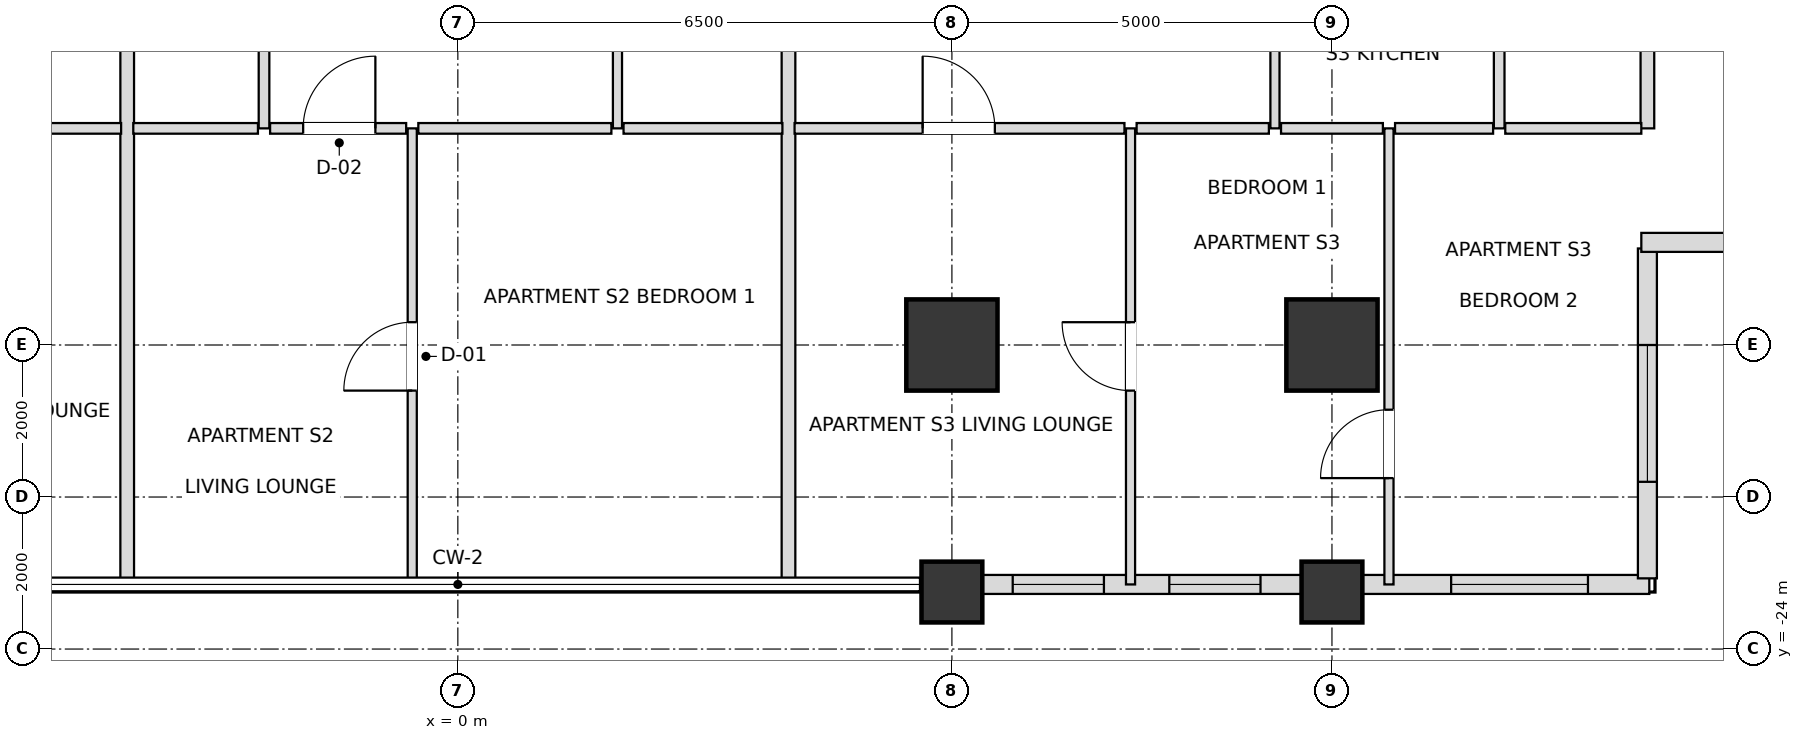
"""IFC4 building model, lengths in metres.
Left out: names, types, materials, properties, quantities, classifications, styles, units other than length and angle.
Written with IfcOpenShell. Run it as: python <this file> out.ifc"""

import sys

from ifc_helpers import new_model, si_unit, direction, frame, frame_2d, origin, origin_2d, place, context, subcontext, project, spatial, rectangle, extrude, element, fill, save


model = new_model("IFC4")
c1 = context("Model", 3, precision=1e-05, world=origin(), true_north=direction((0.0, 1.0)))
c2 = subcontext(c1, "Body", "Model", "MODEL_VIEW")
j1 = project(units=[si_unit("LENGTHUNIT", "METRE"), si_unit("PLANEANGLEUNIT", "RADIAN")], contexts=[c1])
p1 = place(None, origin())
s1 = spatial("IfcSite", under=j1, at=p1, CompositionType="ELEMENT")
p2 = place(p1, origin())
s2 = spatial("IfcBuilding", under=s1, at=p2, CompositionType="ELEMENT")
p3 = place(p2, frame((0.0, 0.0, 102.6)))
s3 = spatial("IfcBuildingStorey", under=s2, at=p3, CompositionType="ELEMENT", Elevation=102.6)
for number, where, z_axis, x_axis in (
    (1, (6.5, -20.0, 0.0), (0.0, 0.0, 1.0), (1.0, 0.0, 0.0)),
    (2, (11.5, -20.0, 0.0), (0.0, 0.0, 1.0), (1.0, 0.0, 0.0)),
):
    element("IfcColumn", number, at=place(p3, frame(where, z_axis=z_axis, x_axis=x_axis)), inside=s3, PredefinedType="USERDEFINED", context=c2, shape_type="SweptSolid", body=[
        extrude(rectangle(XDim=1.2, YDim=1.2, at=origin_2d()), origin(), (0.0, 0.0, 1.0), 3.6),
    ])
for number, where, z_axis, x_axis in (
    (3, (6.5, -23.25, 0.0), (0.0, 0.0, 1.0), (1.0, 0.0, 0.0)),
    (4, (11.5, -23.25, 0.0), (0.0, 0.0, 1.0), (1.0, 0.0, 0.0)),
):
    element("IfcColumn", number, at=place(p3, frame(where, z_axis=z_axis, x_axis=x_axis)), inside=s3, PredefinedType="COLUMN", context=c2, shape_type="SweptSolid", body=[
        extrude(rectangle(XDim=0.8, YDim=0.8, at=origin_2d()), origin(), (0.0, 0.0, 1.0), 3.6),
    ])
p4 = place(p3, frame((6.895, -23.15, 0.0), z_axis=(0.0, 0.0, 1.0), x_axis=(1.0, 0.0, 0.0)))
e5 = element("IfcWall", 5, at=p4, inside=s3, PredefinedType="SOLIDWALL", context=c2, shape_type="SweptSolid", body=[
    extrude(rectangle(XDim=4.21, YDim=0.25, at=frame_2d((2.105, 0.0))), origin(), (0.0, 0.0, 1.0), 2.736),
])
p5 = place(p4, frame((0.405, 0.0, 0.72)))
e6 = element("IfcOpeningElement", 6, at=p5, cuts=e5, PredefinedType="OPENING", context=c2, shape_type="SweptSolid", body=[
    extrude(rectangle(XDim=1.2, YDim=1.68, at=frame_2d((0.6, 0.84))), frame((0.0, 0.135, 0.0), z_axis=(0.0, -1.0, 0.0), x_axis=(1.0, 0.0, 0.0)), (0.0, 0.0, 1.0), 0.27),
])
p6 = place(p4, frame((2.465, 0.0, 0.72)))
e7 = element("IfcOpeningElement", 7, at=p6, cuts=e5, PredefinedType="OPENING", context=c2, shape_type="SweptSolid", body=[
    extrude(rectangle(XDim=1.2, YDim=1.68, at=frame_2d((0.6, 0.84))), frame((0.0, 0.135, 0.0), z_axis=(0.0, -1.0, 0.0), x_axis=(1.0, 0.0, 0.0)), (0.0, 0.0, 1.0), 0.27),
])
p7 = place(p3, frame((11.895, -23.15, 0.0), z_axis=(0.0, 0.0, 1.0), x_axis=(1.0, 0.0, 0.0)))
e8 = element("IfcWall", 8, at=p7, inside=s3, PredefinedType="SOLIDWALL", context=c2, shape_type="SweptSolid", body=[
    extrude(rectangle(XDim=3.78, YDim=0.25, at=frame_2d((1.89, 0.0))), origin(), (0.0, 0.0, 1.0), 2.736),
])
p8 = place(p7, frame((1.173, 0.0, 0.72)))
e9 = element("IfcOpeningElement", 9, at=p8, cuts=e8, PredefinedType="OPENING", context=c2, shape_type="SweptSolid", body=[
    extrude(rectangle(XDim=1.8, YDim=1.68, at=frame_2d((0.9, 0.84))), frame((0.0, 0.135, 0.0), z_axis=(0.0, -1.0, 0.0), x_axis=(1.0, 0.0, 0.0)), (0.0, 0.0, 1.0), 0.27),
])
p9 = place(p3, frame((15.65, -23.07, 0.0), z_axis=(0.0, 0.0, 1.0), x_axis=(0.0, 1.0, 0.0)))
e10 = element("IfcWall", 10, at=p9, inside=s3, PredefinedType="SOLIDWALL", context=c2, shape_type="SweptSolid", body=[
    extrude(rectangle(XDim=4.34, YDim=0.25, at=frame_2d((2.17, 0.0))), origin(), (0.0, 0.0, 1.0), 2.736),
])
p10 = place(p9, frame((1.27, 0.0, 0.72)))
e11 = element("IfcOpeningElement", 11, at=p10, cuts=e10, PredefinedType="OPENING", context=c2, shape_type="SweptSolid", body=[
    extrude(rectangle(XDim=1.8, YDim=1.68, at=frame_2d((0.9, 0.84))), frame((0.0, 0.135, 0.0), z_axis=(0.0, -1.0, 0.0), x_axis=(1.0, 0.0, 0.0)), (0.0, 0.0, 1.0), 0.27),
])
p11 = place(p3, frame((15.57, -18.65, 0.0), z_axis=(0.0, 0.0, 1.0), x_axis=(1.0, 0.0, 0.0)))
e12 = element("IfcWall", 12, at=p11, inside=s3, PredefinedType="SOLIDWALL", context=c2, shape_type="SweptSolid", body=[
    extrude(rectangle(XDim=4.66, YDim=0.25, at=frame_2d((2.33, 0.0))), origin(), (0.0, 0.0, 1.0), 2.736),
])
p12 = place(p11, frame((1.43, 0.0, 0.72)))
e13 = element("IfcOpeningElement", 13, at=p12, cuts=e12, PredefinedType="OPENING", context=c2, shape_type="SweptSolid", body=[
    extrude(rectangle(XDim=1.8, YDim=1.68, at=frame_2d((0.9, 0.84))), frame((0.0, 0.135, 0.0), z_axis=(0.0, -1.0, 0.0), x_axis=(1.0, 0.0, 0.0)), (0.0, 0.0, 1.0), 0.27),
])
p13 = place(p3, frame((-4.35, -23.15, 0.0), z_axis=(0.0, 0.0, 1.0), x_axis=(0.0, 1.0, 0.0)))
e14 = element("IfcWall", 14, at=p13, inside=s3, PredefinedType="PARTITIONING", context=c2, shape_type="SweptSolid", body=[
    extrude(rectangle(XDim=13.85, YDim=0.18, at=frame_2d((6.925, 0.0))), origin(), (0.0, 0.0, 1.0), 2.816),
])
p14 = place(p3, frame((-2.55, -17.15, 0.0), z_axis=(0.0, 0.0, 1.0), x_axis=(0.0, 1.0, 0.0)))
e15 = element("IfcWall", 15, at=p14, inside=s3, PredefinedType="PARTITIONING", context=c2, shape_type="SweptSolid", body=[
    extrude(rectangle(XDim=7.85, YDim=0.14, at=frame_2d((3.925, 0.0))), origin(), (0.0, 0.0, 1.0), 3.38),
])
p15 = place(p14, frame((3.48, 0.0, 0.0)))
e16 = element("IfcOpeningElement", 16, at=p15, cuts=e15, PredefinedType="OPENING", context=c2, shape_type="SweptSolid", body=[
    extrude(rectangle(XDim=0.9, YDim=2.1, at=frame_2d((0.45, 1.05))), frame((0.0, 0.08, 0.0), z_axis=(0.0, -1.0, 0.0), x_axis=(1.0, 0.0, 0.0)), (0.0, 0.0, 1.0), 0.16),
])
p16 = place(p3, frame((-0.6, -23.15, 0.0), z_axis=(0.0, 0.0, 1.0), x_axis=(0.0, 1.0, 0.0)))
e17 = element("IfcWall", 17, at=p16, inside=s3, PredefinedType="PARTITIONING", context=c2, shape_type="SweptSolid", body=[
    extrude(rectangle(XDim=6.0, YDim=0.12, at=frame_2d((3.0, 0.0))), origin(), (0.0, 0.0, 1.0), 2.816),
])
p17 = place(p16, frame((2.55, 0.0, 0.0)))
e18 = element("IfcOpeningElement", 18, at=p17, cuts=e17, PredefinedType="OPENING", context=c2, shape_type="SweptSolid", body=[
    extrude(rectangle(XDim=0.9, YDim=2.1, at=frame_2d((0.45, 1.05))), frame((0.0, 0.07, 0.0), z_axis=(0.0, -1.0, 0.0), x_axis=(1.0, 0.0, 0.0)), (0.0, 0.0, 1.0), 0.14),
])
p18 = place(p3, frame((2.1, -17.15, 0.0), z_axis=(0.0, 0.0, 1.0), x_axis=(0.0, 1.0, 0.0)))
e19 = element("IfcWall", 19, at=p18, inside=s3, PredefinedType="PARTITIONING", context=c2, shape_type="SweptSolid", body=[
    extrude(rectangle(XDim=7.85, YDim=0.12, at=frame_2d((3.925, 0.0))), origin(), (0.0, 0.0, 1.0), 3.38),
])
p19 = place(p18, frame((3.455, 0.0, 0.0)))
e20 = element("IfcOpeningElement", 20, at=p19, cuts=e19, PredefinedType="OPENING", context=c2, shape_type="SweptSolid", body=[
    extrude(rectangle(XDim=0.95, YDim=2.1, at=frame_2d((0.475, 1.05))), frame((0.0, 0.07, 0.0), z_axis=(0.0, -1.0, 0.0), x_axis=(1.0, 0.0, 0.0)), (0.0, 0.0, 1.0), 0.14),
])
p20 = place(p3, frame((4.35, -23.15, 0.0), z_axis=(0.0, 0.0, 1.0), x_axis=(0.0, 1.0, 0.0)))
e21 = element("IfcWall", 21, at=p20, inside=s3, PredefinedType="PARTITIONING", context=c2, shape_type="SweptSolid", body=[
    extrude(rectangle(XDim=13.85, YDim=0.18, at=frame_2d((6.925, 0.0))), origin(), (0.0, 0.0, 1.0), 2.816),
])
p21 = place(p3, frame((8.85, -23.15, 0.0), z_axis=(0.0, 0.0, 1.0), x_axis=(0.0, 1.0, 0.0)))
e22 = element("IfcWall", 22, at=p21, inside=s3, PredefinedType="PARTITIONING", context=c2, shape_type="SweptSolid", body=[
    extrude(rectangle(XDim=6.0, YDim=0.12, at=frame_2d((3.0, 0.0))), origin(), (0.0, 0.0, 1.0), 2.816),
])
p22 = place(p21, frame((2.55, 0.0, 0.0)))
e23 = element("IfcOpeningElement", 23, at=p22, cuts=e22, PredefinedType="OPENING", context=c2, shape_type="SweptSolid", body=[
    extrude(rectangle(XDim=0.9, YDim=2.1, at=frame_2d((0.45, 1.05))), frame((0.0, 0.07, 0.0), z_axis=(0.0, -1.0, 0.0), x_axis=(1.0, 0.0, 0.0)), (0.0, 0.0, 1.0), 0.14),
])
p23 = place(p3, frame((10.75, -17.15, 0.0), z_axis=(0.0, 0.0, 1.0), x_axis=(0.0, 1.0, 0.0)))
e24 = element("IfcWall", 24, at=p23, inside=s3, PredefinedType="PARTITIONING", context=c2, shape_type="SweptSolid", body=[
    extrude(rectangle(XDim=7.85, YDim=0.12, at=frame_2d((3.925, 0.0))), origin(), (0.0, 0.0, 1.0), 2.816),
])
p24 = place(p23, frame((2.681, 0.0, 0.0)))
e25 = element("IfcOpeningElement", 25, at=p24, cuts=e24, PredefinedType="OPENING", context=c2, shape_type="SweptSolid", body=[
    extrude(rectangle(XDim=0.95, YDim=2.1, at=frame_2d((0.475, 1.05))), frame((0.0, 0.07, 0.0), z_axis=(0.0, -1.0, 0.0), x_axis=(1.0, 0.0, 0.0)), (0.0, 0.0, 1.0), 0.14),
])
p25 = place(p3, frame((12.25, -23.15, 0.0), z_axis=(0.0, 0.0, 1.0), x_axis=(0.0, 1.0, 0.0)))
e26 = element("IfcWall", 26, at=p25, inside=s3, PredefinedType="PARTITIONING", context=c2, shape_type="SweptSolid", body=[
    extrude(rectangle(XDim=6.0, YDim=0.12, at=frame_2d((3.0, 0.0))), origin(), (0.0, 0.0, 1.0), 2.736),
])
p26 = place(p25, frame((1.399, 0.0, 0.0)))
e27 = element("IfcOpeningElement", 27, at=p26, cuts=e26, PredefinedType="OPENING", context=c2, shape_type="SweptSolid", body=[
    extrude(rectangle(XDim=0.9, YDim=2.1, at=frame_2d((0.45, 1.05))), frame((0.0, 0.07, 0.0), z_axis=(0.0, -1.0, 0.0), x_axis=(1.0, 0.0, 0.0)), (0.0, 0.0, 1.0), 0.14),
])
p27 = place(p3, frame((13.7, -17.15, 0.0), z_axis=(0.0, 0.0, 1.0), x_axis=(0.0, 1.0, 0.0)))
e28 = element("IfcWall", 28, at=p27, inside=s3, PredefinedType="PARTITIONING", context=c2, shape_type="SweptSolid", body=[
    extrude(rectangle(XDim=7.85, YDim=0.14, at=frame_2d((3.925, 0.0))), origin(), (0.0, 0.0, 1.0), 2.736),
])
p28 = place(p27, frame((3.48, 0.0, 0.0)))
e29 = element("IfcOpeningElement", 29, at=p28, cuts=e28, PredefinedType="OPENING", context=c2, shape_type="SweptSolid", body=[
    extrude(rectangle(XDim=0.9, YDim=2.1, at=frame_2d((0.45, 1.05))), frame((0.0, 0.08, 0.0), z_axis=(0.0, -1.0, 0.0), x_axis=(1.0, 0.0, 0.0)), (0.0, 0.0, 1.0), 0.16),
])
p29 = place(p3, frame((15.65, -17.15, 0.0), z_axis=(0.0, 0.0, 1.0), x_axis=(0.0, 1.0, 0.0)))
e30 = element("IfcWall", 30, at=p29, inside=s3, PredefinedType="PARTITIONING", context=c2, shape_type="SweptSolid", body=[
    extrude(rectangle(XDim=7.85, YDim=0.18, at=frame_2d((3.925, 0.0))), origin(), (0.0, 0.0, 1.0), 2.736),
])
p30 = place(p3, frame((-8.77, -17.15, 0.0), z_axis=(0.0, 0.0, 1.0), x_axis=(1.0, 0.0, 0.0)))
e31 = element("IfcWall", 31, at=p30, inside=s3, PredefinedType="PARTITIONING", context=c2, shape_type="SweptSolid", body=[
    extrude(rectangle(XDim=4.34, YDim=0.14, at=frame_2d((2.17, 0.0))), origin(), (0.0, 0.0, 1.0), 2.816),
])
p31 = place(p30, frame((1.695, 0.0, 0.0)))
e32 = element("IfcOpeningElement", 32, at=p31, cuts=e31, PredefinedType="OPENING", context=c2, shape_type="SweptSolid", body=[
    extrude(rectangle(XDim=0.95, YDim=2.1, at=frame_2d((0.475, 1.05))), frame((0.0, 0.08, 0.0), z_axis=(0.0, -1.0, 0.0), x_axis=(1.0, 0.0, 0.0)), (0.0, 0.0, 1.0), 0.16),
])
p32 = place(p3, frame((-4.27, -17.15, 0.0), z_axis=(0.0, 0.0, 1.0), x_axis=(1.0, 0.0, 0.0)))
e33 = element("IfcWall", 33, at=p32, inside=s3, PredefinedType="PARTITIONING", context=c2, shape_type="SweptSolid", body=[
    extrude(rectangle(XDim=1.64, YDim=0.14, at=frame_2d((0.82, 0.0))), origin(), (0.0, 0.0, 1.0), 3.38),
])
p33 = place(p3, frame((-2.47, -17.15, 0.0), z_axis=(0.0, 0.0, 1.0), x_axis=(1.0, 0.0, 0.0)))
e34 = element("IfcWall", 34, at=p33, inside=s3, PredefinedType="PARTITIONING", context=c2, shape_type="SweptSolid", body=[
    extrude(rectangle(XDim=1.79, YDim=0.14, at=frame_2d((0.895, 0.0))), origin(), (0.0, 0.0, 1.0), 3.38),
])
p34 = place(p33, frame((0.435, 0.0, 0.0)))
e35 = element("IfcOpeningElement", 35, at=p34, cuts=e34, PredefinedType="OPENING", context=c2, shape_type="SweptSolid", body=[
    extrude(rectangle(XDim=0.95, YDim=2.1, at=frame_2d((0.475, 1.05))), frame((0.0, 0.08, 0.0), z_axis=(0.0, -1.0, 0.0), x_axis=(1.0, 0.0, 0.0)), (0.0, 0.0, 1.0), 0.16),
])
p35 = place(p3, frame((-0.52, -17.15, 0.0), z_axis=(0.0, 0.0, 1.0), x_axis=(1.0, 0.0, 0.0)))
e36 = element("IfcWall", 36, at=p35, inside=s3, PredefinedType="PARTITIONING", context=c2, shape_type="SweptSolid", body=[
    extrude(rectangle(XDim=2.54, YDim=0.14, at=frame_2d((1.27, 0.0))), origin(), (0.0, 0.0, 1.0), 3.38),
])
p36 = place(p3, frame((2.18, -17.15, 0.0), z_axis=(0.0, 0.0, 1.0), x_axis=(1.0, 0.0, 0.0)))
e37 = element("IfcWall", 37, at=p36, inside=s3, PredefinedType="PARTITIONING", context=c2, shape_type="SweptSolid", body=[
    extrude(rectangle(XDim=2.09, YDim=0.14, at=frame_2d((1.045, 0.0))), origin(), (0.0, 0.0, 1.0), 3.38),
])
p37 = place(p3, frame((4.43, -17.15, 0.0), z_axis=(0.0, 0.0, 1.0), x_axis=(1.0, 0.0, 0.0)))
e38 = element("IfcWall", 38, at=p37, inside=s3, PredefinedType="PARTITIONING", context=c2, shape_type="SweptSolid", body=[
    extrude(rectangle(XDim=4.34, YDim=0.14, at=frame_2d((2.17, 0.0))), origin(), (0.0, 0.0, 1.0), 2.816),
])
p38 = place(p37, frame((1.685, 0.0, 0.0)))
e39 = element("IfcOpeningElement", 39, at=p38, cuts=e38, PredefinedType="OPENING", context=c2, shape_type="SweptSolid", body=[
    extrude(rectangle(XDim=0.95, YDim=2.1, at=frame_2d((0.475, 1.05))), frame((0.0, 0.08, 0.0), z_axis=(0.0, -1.0, 0.0), x_axis=(1.0, 0.0, 0.0)), (0.0, 0.0, 1.0), 0.16),
])
p39 = place(p3, frame((8.93, -17.15, 0.0), z_axis=(0.0, 0.0, 1.0), x_axis=(1.0, 0.0, 0.0)))
e40 = element("IfcWall", 40, at=p39, inside=s3, PredefinedType="PARTITIONING", context=c2, shape_type="SweptSolid", body=[
    extrude(rectangle(XDim=1.74, YDim=0.14, at=frame_2d((0.87, 0.0))), origin(), (0.0, 0.0, 1.0), 3.38),
])
p40 = place(p3, frame((10.83, -17.15, 0.0), z_axis=(0.0, 0.0, 1.0), x_axis=(1.0, 0.0, 0.0)))
e41 = element("IfcWall", 41, at=p40, inside=s3, PredefinedType="PARTITIONING", context=c2, shape_type="SweptSolid", body=[
    extrude(rectangle(XDim=1.34, YDim=0.14, at=frame_2d((0.67, 0.0))), origin(), (0.0, 0.0, 1.0), 2.736),
])
p41 = place(p3, frame((12.33, -17.15, 0.0), z_axis=(0.0, 0.0, 1.0), x_axis=(1.0, 0.0, 0.0)))
e42 = element("IfcWall", 42, at=p41, inside=s3, PredefinedType="PARTITIONING", context=c2, shape_type="SweptSolid", body=[
    extrude(rectangle(XDim=1.29, YDim=0.14, at=frame_2d((0.645, 0.0))), origin(), (0.0, 0.0, 1.0), 2.736),
])
p42 = place(p3, frame((13.78, -17.15, 0.0), z_axis=(0.0, 0.0, 1.0), x_axis=(1.0, 0.0, 0.0)))
e43 = element("IfcWall", 43, at=p42, inside=s3, PredefinedType="PARTITIONING", context=c2, shape_type="SweptSolid", body=[
    extrude(rectangle(XDim=1.79, YDim=0.14, at=frame_2d((0.895, 0.0))), origin(), (0.0, 0.0, 1.0), 2.736),
])
p43 = place(p5, origin())
e44 = element("IfcWindow", 44, at=p43, inside=s3, PartitioningType="SINGLE_PANEL", PredefinedType="WINDOW", context=c2, shape_type="SweptSolid", body=[
    extrude(rectangle(XDim=1.2, YDim=1.68, at=frame_2d((0.6, 0.84))), frame((0.0, 0.03, 0.0), z_axis=(0.0, -1.0, 0.0), x_axis=(1.0, 0.0, 0.0)), (0.0, 0.0, 1.0), 0.06),
])
fill(e6, e44)
p44 = place(p6, origin())
e45 = element("IfcWindow", 45, at=p44, inside=s3, PartitioningType="SINGLE_PANEL", PredefinedType="WINDOW", context=c2, shape_type="SweptSolid", body=[
    extrude(rectangle(XDim=1.2, YDim=1.68, at=frame_2d((0.6, 0.84))), frame((0.0, 0.03, 0.0), z_axis=(0.0, -1.0, 0.0), x_axis=(1.0, 0.0, 0.0)), (0.0, 0.0, 1.0), 0.06),
])
fill(e7, e45)
p45 = place(p8, origin())
e46 = element("IfcWindow", 46, at=p45, inside=s3, PartitioningType="SINGLE_PANEL", PredefinedType="WINDOW", context=c2, shape_type="SweptSolid", body=[
    extrude(rectangle(XDim=1.8, YDim=1.68, at=frame_2d((0.9, 0.84))), frame((0.0, 0.03, 0.0), z_axis=(0.0, -1.0, 0.0), x_axis=(1.0, 0.0, 0.0)), (0.0, 0.0, 1.0), 0.06),
])
fill(e9, e46)
p46 = place(p10, origin())
e47 = element("IfcWindow", 47, at=p46, inside=s3, PartitioningType="SINGLE_PANEL", PredefinedType="WINDOW", context=c2, shape_type="SweptSolid", body=[
    extrude(rectangle(XDim=1.8, YDim=1.68, at=frame_2d((0.9, 0.84))), frame((0.0, 0.03, 0.0), z_axis=(0.0, -1.0, 0.0), x_axis=(1.0, 0.0, 0.0)), (0.0, 0.0, 1.0), 0.06),
])
fill(e11, e47)
p47 = place(p34, origin())
e48 = element("IfcDoor", 48, at=p47, inside=s3, OperationType="SINGLE_SWING_RIGHT", PredefinedType="DOOR", context=c2, shape_type="SweptSolid", body=[
    extrude(rectangle(XDim=0.95, YDim=2.1, at=frame_2d((0.475, 1.05))), frame((0.0, 0.025, 0.0), z_axis=(0.0, -1.0, 0.0), x_axis=(1.0, 0.0, 0.0)), (0.0, 0.0, 1.0), 0.05),
])
fill(e35, e48)
p48 = place(p17, origin())
e49 = element("IfcDoor", 49, at=p48, inside=s3, OperationType="SINGLE_SWING_LEFT", PredefinedType="DOOR", context=c2, shape_type="SweptSolid", body=[
    extrude(rectangle(XDim=0.9, YDim=2.1, at=frame_2d((0.45, 1.05))), frame((0.0, 0.025, 0.0), z_axis=(0.0, -1.0, 0.0), x_axis=(1.0, 0.0, 0.0)), (0.0, 0.0, 1.0), 0.05),
])
fill(e18, e49)
p49 = place(p38, origin())
e50 = element("IfcDoor", 50, at=p49, inside=s3, OperationType="SINGLE_SWING_LEFT", PredefinedType="DOOR", context=c2, shape_type="SweptSolid", body=[
    extrude(rectangle(XDim=0.95, YDim=2.1, at=frame_2d((0.475, 1.05))), frame((0.0, 0.025, 0.0), z_axis=(0.0, -1.0, 0.0), x_axis=(1.0, 0.0, 0.0)), (0.0, 0.0, 1.0), 0.05),
])
fill(e39, e50)
p50 = place(p22, origin())
e51 = element("IfcDoor", 51, at=p50, inside=s3, OperationType="SINGLE_SWING_RIGHT", PredefinedType="DOOR", context=c2, shape_type="SweptSolid", body=[
    extrude(rectangle(XDim=0.9, YDim=2.1, at=frame_2d((0.45, 1.05))), frame((0.0, 0.025, 0.0), z_axis=(0.0, -1.0, 0.0), x_axis=(1.0, 0.0, 0.0)), (0.0, 0.0, 1.0), 0.05),
])
fill(e23, e51)
p51 = place(p26, origin())
e52 = element("IfcDoor", 52, at=p51, inside=s3, OperationType="SINGLE_SWING_LEFT", PredefinedType="DOOR", context=c2, shape_type="SweptSolid", body=[
    extrude(rectangle(XDim=0.9, YDim=2.1, at=frame_2d((0.45, 1.05))), frame((0.0, 0.025, 0.0), z_axis=(0.0, -1.0, 0.0), x_axis=(1.0, 0.0, 0.0)), (0.0, 0.0, 1.0), 0.05),
])
fill(e27, e52)
save(model, sys.argv[1])
